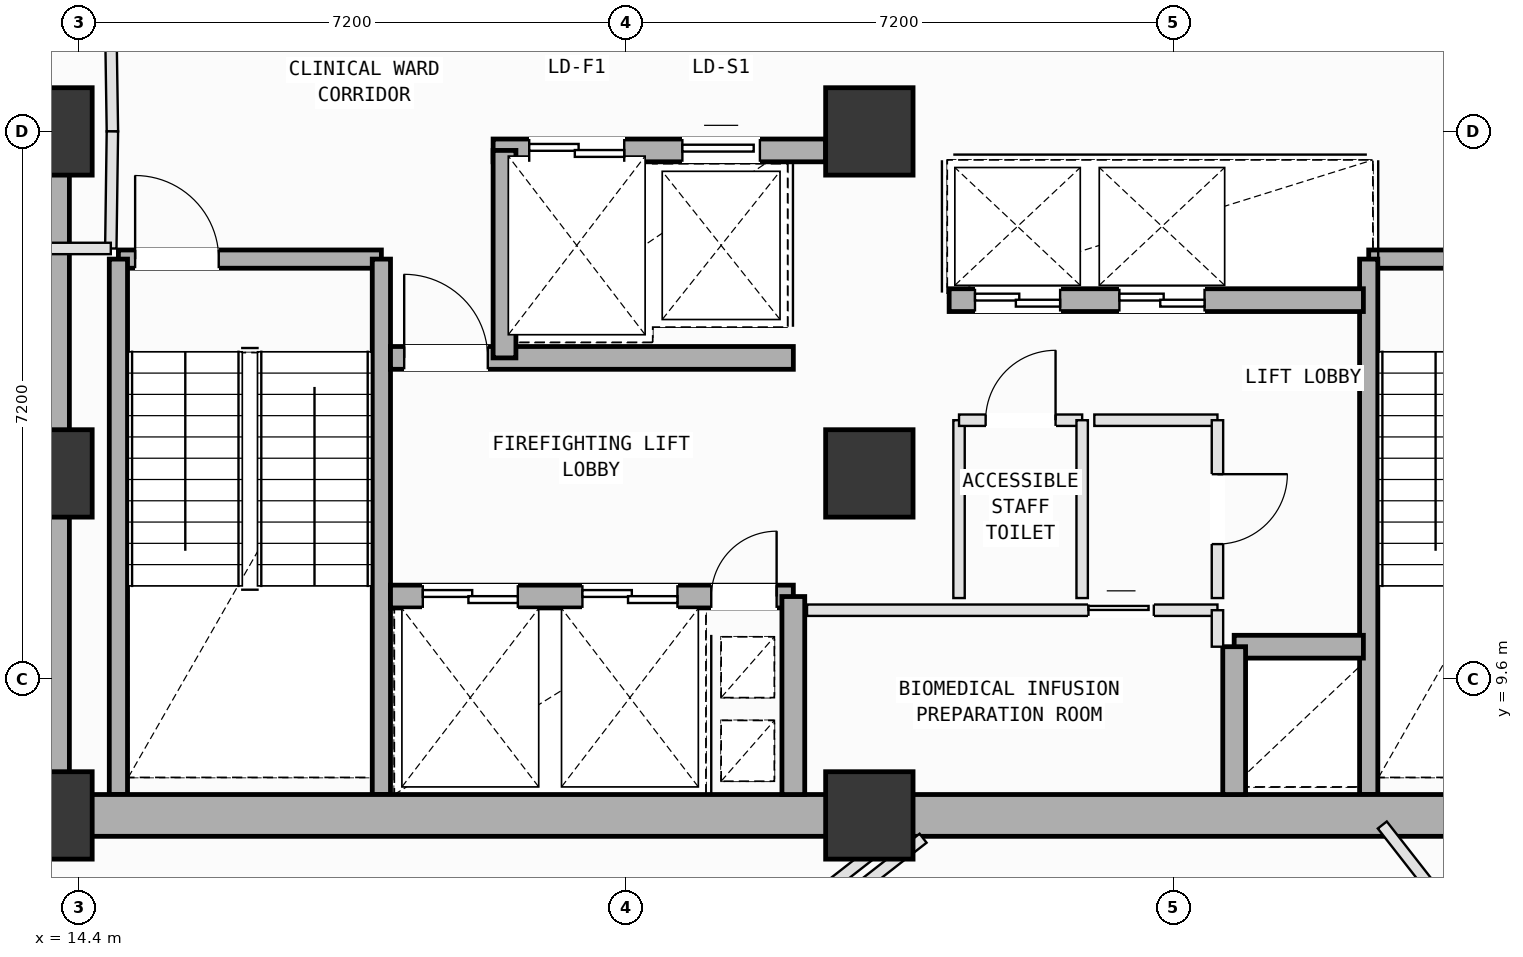
"""IFC4 building model, lengths in metres.
Left out: names, types, materials, properties, quantities, classifications, styles, units other than length and angle.
Written with IfcOpenShell. Run it as: python <this file> out.ifc"""

import sys

from ifc_helpers import new_model, si_unit, direction, frame, frame_2d, origin, origin_2d, place, context, subcontext, project, spatial, rectangle, extrude, element, fill, save


model = new_model("IFC4")
c1 = context("Model", 3, precision=1e-05, world=origin(), true_north=direction((0.0, 1.0)))
c2 = subcontext(c1, "Body", "Model", "MODEL_VIEW")
j1 = project(units=[si_unit("LENGTHUNIT", "METRE"), si_unit("PLANEANGLEUNIT", "RADIAN")], contexts=[c1])
p1 = place(None, origin())
s1 = spatial("IfcSite", under=j1, at=p1, CompositionType="ELEMENT")
p2 = place(p1, origin())
s2 = spatial("IfcBuilding", under=s1, at=p2, CompositionType="ELEMENT")
p3 = place(p2, frame((0.0, 0.0, 185.8)))
s3 = spatial("IfcBuildingStorey", under=s2, at=p3, CompositionType="ELEMENT", Elevation=185.8)
for number, where, z_axis, x_axis in (
    (1, (14.0, 7.8, 0.0), (0.0, 0.0, 1.0), (1.0, 0.0, 0.0)),
    (2, (14.0, 12.3, 0.0), (0.0, 0.0, 1.0), (1.0, 0.0, 0.0)),
    (3, (14.0, 16.8, 0.0), (0.0, 0.0, 1.0), (1.0, 0.0, 0.0)),
    (4, (24.8, 7.8, 0.0), (0.0, 0.0, 1.0), (1.0, 0.0, 0.0)),
    (5, (24.8, 12.3, 0.0), (0.0, 0.0, 1.0), (1.0, 0.0, 0.0)),
    (6, (24.8, 16.8, 0.0), (0.0, 0.0, 1.0), (1.0, 0.0, 0.0)),
):
    element("IfcColumn", number, at=place(p3, frame(where, z_axis=z_axis, x_axis=x_axis)), inside=s3, PredefinedType="COLUMN", context=c2, shape_type="SweptSolid", body=[
        extrude(rectangle(XDim=1.15, YDim=1.15, at=origin_2d()), origin(), (0.0, 0.0, 1.0), 4.0),
    ])
p4 = place(p3, frame((15.746, 3.066, 0.0), z_axis=(0.0, 0.0, 1.0), x_axis=(-0.615661421178, 0.788010795912, 0.0)))
e7 = element("IfcWall", 7, at=p4, inside=s3, PredefinedType="SOLIDWALL", context=c2, shape_type="SweptSolid", body=[
    extrude(rectangle(XDim=7.36, YDim=0.28, at=frame_2d((3.68, 0.0))), origin(), (0.0, 0.0, 1.0), 3.065),
])
p5 = place(p4, frame((1.788, 0.0, 0.75)))
e8 = element("IfcOpeningElement", 8, at=p5, cuts=e7, PredefinedType="OPENING", context=c2, shape_type="SweptSolid", body=[
    extrude(rectangle(XDim=2.0, YDim=1.95, at=frame_2d((1.0, 0.975))), frame((0.0, 0.15, 0.0), z_axis=(0.0, -1.0, 0.0), x_axis=(1.0, 0.0, 0.0)), (0.0, 0.0, 1.0), 0.3),
])
p6 = place(p3, frame((14.92, 15.12, 0.0), z_axis=(0.0, 0.0, 1.0), x_axis=(1.0, 0.0, 0.0)))
e9 = element("IfcWall", 9, at=p6, inside=s3, PredefinedType="SOLIDWALL", context=c2, shape_type="SweptSolid", body=[
    extrude(rectangle(XDim=3.46, YDim=0.24, at=frame_2d((1.73, 0.0))), origin(), (0.0, 0.0, 1.0), 3.78),
])
p7 = place(p6, frame((0.22, 0.0, 0.0)))
e10 = element("IfcOpeningElement", 10, at=p7, cuts=e9, PredefinedType="OPENING", context=c2, shape_type="SweptSolid", body=[
    extrude(rectangle(XDim=1.1, YDim=2.15, at=frame_2d((0.55, 1.075))), frame((0.0, 0.13, 0.0), z_axis=(0.0, -1.0, 0.0), x_axis=(1.0, 0.0, 0.0)), (0.0, 0.0, 1.0), 0.26),
])
for number, where, z_axis, x_axis in (
    (11, (18.38, 15.12, 0.0), (0.0, 0.0, 1.0), (0.0, -1.0, 0.0)),
    (12, (14.92, 8.075, 0.0), (0.0, 0.0, 1.0), (0.0, 1.0, 0.0)),
):
    element("IfcWall", number, at=place(p3, frame(where, z_axis=z_axis, x_axis=x_axis)), inside=s3, PredefinedType="SOLIDWALL", context=c2, shape_type="SweptSolid", body=[
        extrude(rectangle(XDim=7.045, YDim=0.24, at=frame_2d((3.522, 0.0))), origin(), (0.0, 0.0, 1.0), 3.78),
    ])
p8 = place(p3, frame((31.37, 15.12, 0.0), z_axis=(0.0, 0.0, 1.0), x_axis=(1.0, 0.0, 0.0)))
e13 = element("IfcWall", 13, at=p8, inside=s3, PredefinedType="SOLIDWALL", context=c2, shape_type="SweptSolid", body=[
    extrude(rectangle(XDim=3.46, YDim=0.24, at=frame_2d((1.73, 0.0))), origin(), (0.0, 0.0, 1.0), 3.78),
])
p9 = place(p8, frame((2.14, 0.0, 0.0)))
e14 = element("IfcOpeningElement", 14, at=p9, cuts=e13, PredefinedType="OPENING", context=c2, shape_type="SweptSolid", body=[
    extrude(rectangle(XDim=1.1, YDim=2.15, at=frame_2d((0.55, 1.075))), frame((0.0, 0.13, 0.0), z_axis=(0.0, -1.0, 0.0), x_axis=(1.0, 0.0, 0.0)), (0.0, 0.0, 1.0), 0.26),
])
p10 = place(p3, frame((31.37, 8.075, 0.0), z_axis=(0.0, 0.0, 1.0), x_axis=(0.0, 1.0, 0.0)))
e15 = element("IfcWall", 15, at=p10, inside=s3, PredefinedType="SOLIDWALL", context=c2, shape_type="SweptSolid", body=[
    extrude(rectangle(XDim=7.045, YDim=0.24, at=frame_2d((3.522, 0.0))), origin(), (0.0, 0.0, 1.0), 3.78),
])
for number, where, z_axis, x_axis in (
    (16, (14.0, 7.8, 0.0), (0.0, 0.0, 1.0), (1.0, 0.0, 0.0)),
    (17, (24.8, 7.8, 0.0), (0.0, 0.0, 1.0), (1.0, 0.0, 0.0)),
):
    element("IfcWall", number, at=place(p3, frame(where, z_axis=z_axis, x_axis=x_axis)), inside=s3, PredefinedType="SHEAR", context=c2, shape_type="SweptSolid", body=[
        extrude(rectangle(XDim=10.8, YDim=0.55, at=frame_2d((5.4, 0.0))), origin(), (0.0, 0.0, 1.0), 3.78),
    ])
p11 = place(p3, frame((14.0, 16.8, 0.0), z_axis=(0.0, 0.0, 1.0), x_axis=(0.0, -1.0, 0.0)))
e18 = element("IfcWall", 18, at=p11, inside=s3, PredefinedType="SHEAR", context=c2, shape_type="SweptSolid", body=[
    extrude(rectangle(XDim=9.0, YDim=0.55, at=frame_2d((4.5, 0.0))), origin(), (0.0, 0.0, 1.0), 3.78),
])
p12 = place(p3, frame((19.85, 16.55, 0.0), z_axis=(0.0, 0.0, 1.0), x_axis=(1.0, 0.0, 0.0)))
e19 = element("IfcWall", 19, at=p12, inside=s3, PredefinedType="SOLIDWALL", context=c2, shape_type="SweptSolid", body=[
    extrude(rectangle(XDim=4.375, YDim=0.3, at=frame_2d((2.188, 0.0))), origin(), (0.0, 0.0, 1.0), 3.78),
])
p13 = place(p12, frame((0.475, 0.0, 0.0)))
e20 = element("IfcOpeningElement", 20, at=p13, cuts=e19, PredefinedType="OPENING", context=c2, shape_type="SweptSolid", body=[
    extrude(rectangle(XDim=1.25, YDim=2.18, at=frame_2d((0.625, 1.09))), frame((0.0, 0.16, 0.0), z_axis=(0.0, -1.0, 0.0), x_axis=(1.0, 0.0, 0.0)), (0.0, 0.0, 1.0), 0.32),
])
p14 = place(p12, frame((2.49, 0.0, 0.0)))
e21 = element("IfcOpeningElement", 21, at=p14, cuts=e19, PredefinedType="OPENING", context=c2, shape_type="SweptSolid", body=[
    extrude(rectangle(XDim=1.02, YDim=2.12, at=frame_2d((0.51, 1.06))), frame((0.0, 0.16, 0.0), z_axis=(0.0, -1.0, 0.0), x_axis=(1.0, 0.0, 0.0)), (0.0, 0.0, 1.0), 0.32),
])
p15 = place(p3, frame((18.5, 10.68, 0.0), z_axis=(0.0, 0.0, 1.0), x_axis=(1.0, 0.0, 0.0)))
e22 = element("IfcWall", 22, at=p15, inside=s3, PredefinedType="SOLIDWALL", context=c2, shape_type="SweptSolid", body=[
    extrude(rectangle(XDim=5.3, YDim=0.3, at=frame_2d((2.65, 0.0))), origin(), (0.0, 0.0, 1.0), 3.78),
])
p16 = place(p15, frame((4.22, 0.0, 0.0)))
e23 = element("IfcOpeningElement", 23, at=p16, cuts=e22, PredefinedType="OPENING", context=c2, shape_type="SweptSolid", body=[
    extrude(rectangle(XDim=0.86, YDim=2.06, at=frame_2d((0.43, 1.03))), frame((0.0, 0.16, 0.0), z_axis=(0.0, -1.0, 0.0), x_axis=(1.0, 0.0, 0.0)), (0.0, 0.0, 1.0), 0.32),
])
p17 = place(p15, frame((0.425, 0.0, 0.0)))
e24 = element("IfcOpeningElement", 24, at=p17, cuts=e22, PredefinedType="OPENING", context=c2, shape_type="SweptSolid", body=[
    extrude(rectangle(XDim=1.25, YDim=2.18, at=frame_2d((0.625, 1.09))), frame((0.0, 0.16, 0.0), z_axis=(0.0, -1.0, 0.0), x_axis=(1.0, 0.0, 0.0)), (0.0, 0.0, 1.0), 0.32),
])
p18 = place(p15, frame((2.525, 0.0, 0.0)))
e25 = element("IfcOpeningElement", 25, at=p18, cuts=e22, PredefinedType="OPENING", context=c2, shape_type="SweptSolid", body=[
    extrude(rectangle(XDim=1.25, YDim=2.18, at=frame_2d((0.625, 1.09))), frame((0.0, 0.16, 0.0), z_axis=(0.0, -1.0, 0.0), x_axis=(1.0, 0.0, 0.0)), (0.0, 0.0, 1.0), 0.32),
])
p19 = place(p3, frame((18.5, 13.82, 0.0), z_axis=(0.0, 0.0, 1.0), x_axis=(1.0, 0.0, 0.0)))
e26 = element("IfcWall", 26, at=p19, inside=s3, PredefinedType="SOLIDWALL", context=c2, shape_type="SweptSolid", body=[
    extrude(rectangle(XDim=5.3, YDim=0.3, at=frame_2d((2.65, 0.0))), origin(), (0.0, 0.0, 1.0), 3.78),
])
p20 = place(p19, frame((0.18, 0.0, 0.0)))
e27 = element("IfcOpeningElement", 27, at=p20, cuts=e26, PredefinedType="OPENING", context=c2, shape_type="SweptSolid", body=[
    extrude(rectangle(XDim=1.1, YDim=2.15, at=frame_2d((0.55, 1.075))), frame((0.0, 0.16, 0.0), z_axis=(0.0, -1.0, 0.0), x_axis=(1.0, 0.0, 0.0)), (0.0, 0.0, 1.0), 0.32),
])
p21 = place(p3, frame((23.8, 8.075, 0.0), z_axis=(0.0, 0.0, 1.0), x_axis=(0.0, 1.0, 0.0)))
e28 = element("IfcWall", 28, at=p21, inside=s3, PredefinedType="SOLIDWALL", context=c2, shape_type="SweptSolid", body=[
    extrude(rectangle(XDim=2.605, YDim=0.3, at=frame_2d((1.302, 0.0))), origin(), (0.0, 0.0, 1.0), 3.78),
])
p22 = place(p3, frame((20.0, 13.82, 0.0), z_axis=(0.0, 0.0, 1.0), x_axis=(0.0, 1.0, 0.0)))
e29 = element("IfcWall", 29, at=p22, inside=s3, PredefinedType="SOLIDWALL", context=c2, shape_type="SweptSolid", body=[
    extrude(rectangle(XDim=2.73, YDim=0.3, at=frame_2d((1.365, 0.0))), origin(), (0.0, 0.0, 1.0), 3.78),
])
p23 = place(p3, frame((29.6, 10.02, 0.0), z_axis=(0.0, 0.0, 1.0), x_axis=(1.0, 0.0, 0.0)))
e30 = element("IfcWall", 30, at=p23, inside=s3, PredefinedType="SOLIDWALL", context=c2, shape_type="SweptSolid", body=[
    extrude(rectangle(XDim=1.7, YDim=0.3, at=frame_2d((0.85, 0.0))), origin(), (0.0, 0.0, 1.0), 3.78),
])
p24 = place(p3, frame((29.6, 8.075, 0.0), z_axis=(0.0, 0.0, 1.0), x_axis=(0.0, 1.0, 0.0)))
e31 = element("IfcWall", 31, at=p24, inside=s3, PredefinedType="SOLIDWALL", context=c2, shape_type="SweptSolid", body=[
    extrude(rectangle(XDim=1.945, YDim=0.3, at=frame_2d((0.973, 0.0))), origin(), (0.0, 0.0, 1.0), 3.78),
])
p25 = place(p3, frame((25.85, 14.58, 0.0), z_axis=(0.0, 0.0, 1.0), x_axis=(1.0, 0.0, 0.0)))
e32 = element("IfcWall", 32, at=p25, inside=s3, PredefinedType="SOLIDWALL", context=c2, shape_type="SweptSolid", body=[
    extrude(rectangle(XDim=5.45, YDim=0.3, at=frame_2d((2.725, 0.0))), origin(), (0.0, 0.0, 1.0), 3.78),
])
p26 = place(p25, frame((0.34, 0.0, 0.0)))
e33 = element("IfcOpeningElement", 33, at=p26, cuts=e32, PredefinedType="OPENING", context=c2, shape_type="SweptSolid", body=[
    extrude(rectangle(XDim=1.12, YDim=2.15, at=frame_2d((0.56, 1.075))), frame((0.0, 0.16, 0.0), z_axis=(0.0, -1.0, 0.0), x_axis=(1.0, 0.0, 0.0)), (0.0, 0.0, 1.0), 0.32),
])
p27 = place(p25, frame((2.24, 0.0, 0.0)))
e34 = element("IfcOpeningElement", 34, at=p27, cuts=e32, PredefinedType="OPENING", context=c2, shape_type="SweptSolid", body=[
    extrude(rectangle(XDim=1.12, YDim=2.15, at=frame_2d((0.56, 1.075))), frame((0.0, 0.16, 0.0), z_axis=(0.0, -1.0, 0.0), x_axis=(1.0, 0.0, 0.0)), (0.0, 0.0, 1.0), 0.32),
])
p28 = place(p3, frame((23.98, 10.5, 0.0), z_axis=(0.0, 0.0, 1.0), x_axis=(1.0, 0.0, 0.0)))
e35 = element("IfcWall", 35, at=p28, inside=s3, PredefinedType="PARTITIONING", context=c2, shape_type="SweptSolid", body=[
    extrude(rectangle(XDim=5.4, YDim=0.15, at=frame_2d((2.7, 0.0))), origin(), (0.0, 0.0, 1.0), 3.78),
])
p29 = place(p28, frame((3.703, 0.0, 0.0)))
e36 = element("IfcOpeningElement", 36, at=p29, cuts=e35, PredefinedType="OPENING", context=c2, shape_type="SweptSolid", body=[
    extrude(rectangle(XDim=0.86, YDim=2.06, at=frame_2d((0.43, 1.03))), frame((0.0, 0.085, 0.0), z_axis=(0.0, -1.0, 0.0), x_axis=(1.0, 0.0, 0.0)), (0.0, 0.0, 1.0), 0.17),
])
p30 = place(p3, frame((29.38, 10.5, 0.0), z_axis=(0.0, 0.0, 1.0), x_axis=(0.0, -1.0, 0.0)))
e37 = element("IfcWall", 37, at=p30, inside=s3, PredefinedType="PARTITIONING", context=c2, shape_type="SweptSolid", body=[
    extrude(rectangle(XDim=0.48, YDim=0.15, at=frame_2d((0.24, 0.0))), origin(), (0.0, 0.0, 1.0), 3.78),
])
p31 = place(p3, frame((25.98, 10.66, 0.0), z_axis=(0.0, 0.0, 1.0), x_axis=(0.0, 1.0, 0.0)))
e38 = element("IfcWall", 38, at=p31, inside=s3, PredefinedType="PARTITIONING", context=c2, shape_type="SweptSolid", body=[
    extrude(rectangle(XDim=2.34, YDim=0.15, at=frame_2d((1.17, 0.0))), origin(), (0.0, 0.0, 1.0), 3.78),
])
p32 = place(p3, frame((25.98, 13.0, 0.0), z_axis=(0.0, 0.0, 1.0), x_axis=(1.0, 0.0, 0.0)))
e39 = element("IfcWall", 39, at=p32, inside=s3, PredefinedType="PARTITIONING", context=c2, shape_type="SweptSolid", body=[
    extrude(rectangle(XDim=1.62, YDim=0.15, at=frame_2d((0.81, 0.0))), origin(), (0.0, 0.0, 1.0), 3.78),
])
p33 = place(p32, frame((0.35, 0.0, 0.0)))
e40 = element("IfcOpeningElement", 40, at=p33, cuts=e39, PredefinedType="OPENING", context=c2, shape_type="SweptSolid", body=[
    extrude(rectangle(XDim=0.92, YDim=2.1, at=frame_2d((0.46, 1.05))), frame((0.0, 0.085, 0.0), z_axis=(0.0, -1.0, 0.0), x_axis=(1.0, 0.0, 0.0)), (0.0, 0.0, 1.0), 0.17),
])
p34 = place(p3, frame((27.6, 13.0, 0.0), z_axis=(0.0, 0.0, 1.0), x_axis=(0.0, -1.0, 0.0)))
e41 = element("IfcWall", 41, at=p34, inside=s3, PredefinedType="PARTITIONING", context=c2, shape_type="SweptSolid", body=[
    extrude(rectangle(XDim=2.34, YDim=0.15, at=frame_2d((1.17, 0.0))), origin(), (0.0, 0.0, 1.0), 3.78),
])
p35 = place(p3, frame((27.76, 13.0, 0.0), z_axis=(0.0, 0.0, 1.0), x_axis=(1.0, 0.0, 0.0)))
e42 = element("IfcWall", 42, at=p35, inside=s3, PredefinedType="PARTITIONING", context=c2, shape_type="SweptSolid", body=[
    extrude(rectangle(XDim=1.62, YDim=0.15, at=frame_2d((0.81, 0.0))), origin(), (0.0, 0.0, 1.0), 3.78),
])
p36 = place(p3, frame((29.38, 13.0, 0.0), z_axis=(0.0, 0.0, 1.0), x_axis=(0.0, -1.0, 0.0)))
e43 = element("IfcWall", 43, at=p36, inside=s3, PredefinedType="PARTITIONING", context=c2, shape_type="SweptSolid", body=[
    extrude(rectangle(XDim=2.34, YDim=0.15, at=frame_2d((1.17, 0.0))), origin(), (0.0, 0.0, 1.0), 3.78),
])
p37 = place(p36, frame((0.71, 0.0, 0.0)))
e44 = element("IfcOpeningElement", 44, at=p37, cuts=e43, PredefinedType="OPENING", context=c2, shape_type="SweptSolid", body=[
    extrude(rectangle(XDim=0.92, YDim=2.1, at=frame_2d((0.46, 1.05))), frame((0.0, 0.085, 0.0), z_axis=(0.0, -1.0, 0.0), x_axis=(1.0, 0.0, 0.0)), (0.0, 0.0, 1.0), 0.17),
])
p38 = place(p3, frame((23.323, 5.794, 0.0), z_axis=(0.0, 0.0, 1.0), x_axis=(0.788069779756, 0.615585917833, 0.0)))
e45 = element("IfcWall", 45, at=p38, inside=s3, PredefinedType="PARTITIONING", context=c2, shape_type="SweptSolid", body=[
    extrude(rectangle(XDim=2.771, YDim=0.15, at=frame_2d((1.386, 0.0))), origin(), (0.0, 0.0, 1.0), 3.78),
])
p39 = place(p3, frame((31.549, 7.674, 0.0), z_axis=(0.0, 0.0, 1.0), x_axis=(0.615635907998, -0.788030728324, 0.0)))
e46 = element("IfcWall", 46, at=p39, inside=s3, PredefinedType="PARTITIONING", context=c2, shape_type="SweptSolid", body=[
    extrude(rectangle(XDim=9.902, YDim=0.15, at=frame_2d((4.951, 0.0))), origin(), (0.0, 0.0, 1.0), 3.78),
])
p40 = place(p39, frame((4.711, 0.0, 0.0)))
e47 = element("IfcOpeningElement", 47, at=p40, cuts=e46, PredefinedType="OPENING", context=c2, shape_type="SweptSolid", body=[
    extrude(rectangle(XDim=0.86, YDim=2.06, at=frame_2d((0.43, 1.03))), frame((0.0, 0.085, 0.0), z_axis=(0.0, -1.0, 0.0), x_axis=(1.0, 0.0, 0.0)), (0.0, 0.0, 1.0), 0.17),
])
p41 = place(p3, frame((25.085, 7.5, 0.0), z_axis=(0.0, 0.0, 1.0), x_axis=(-0.788054803654, -0.615605089678, 0.0)))
e48 = element("IfcWall", 48, at=p41, inside=s3, PredefinedType="PARTITIONING", context=c2, shape_type="SweptSolid", body=[
    extrude(rectangle(XDim=9.974, YDim=0.15, at=frame_2d((4.987, 0.0))), origin(), (0.0, 0.0, 1.0), 3.78),
])
p42 = place(p3, frame((14.82, 18.2, 0.0), z_axis=(0.0, 0.0, 1.0), x_axis=(0.01499656939, -0.99988754513, 0.0)))
e49 = element("IfcWall", 49, at=p42, inside=s3, PredefinedType="PARTITIONING", context=c2, shape_type="SweptSolid", body=[
    extrude(rectangle(XDim=1.4, YDim=0.15, at=frame_2d((0.7, 0.0))), origin(), (0.0, 0.0, 1.0), 3.78),
])
p43 = place(p3, frame((14.841, 16.8, 0.0), z_axis=(0.0, 0.0, 1.0), x_axis=(-0.01363221443, -0.999907077048, 0.0)))
e50 = element("IfcWall", 50, at=p43, inside=s3, PredefinedType="PARTITIONING", context=c2, shape_type="SweptSolid", body=[
    extrude(rectangle(XDim=1.54, YDim=0.15, at=frame_2d((0.77, 0.0))), origin(), (0.0, 0.0, 1.0), 3.78),
])
p44 = place(p3, frame((14.82, 15.26, 0.0), z_axis=(0.0, 0.0, 1.0), x_axis=(-1.0, 0.0, 0.0)))
e51 = element("IfcWall", 51, at=p44, inside=s3, PredefinedType="PARTITIONING", context=c2, shape_type="SweptSolid", body=[
    extrude(rectangle(XDim=1.12, YDim=0.15, at=frame_2d((0.56, 0.0))), origin(), (0.0, 0.0, 1.0), 3.78),
])
p45 = place(p3, frame((7.227, 14.157, 0.0), z_axis=(0.0, 0.0, 1.0), x_axis=(0.788028517416, 0.615638738011, 0.0)))
e52 = element("IfcWall", 52, at=p45, inside=s3, PredefinedType="PARTITIONING", context=c2, shape_type="SweptSolid", body=[
    extrude(rectangle(XDim=9.826, YDim=0.15, at=frame_2d((4.913, 0.0))), origin(), (0.0, 0.0, 1.0), 3.78),
])
p46 = place(p7, origin())
e53 = element("IfcDoor", 53, at=p46, inside=s3, OperationType="SINGLE_SWING_LEFT", PredefinedType="DOOR", context=c2, shape_type="SweptSolid", body=[
    extrude(rectangle(XDim=1.1, YDim=2.15, at=frame_2d((0.55, 1.075))), frame((0.0, 0.025, 0.0), z_axis=(0.0, -1.0, 0.0), x_axis=(1.0, 0.0, 0.0)), (0.0, 0.0, 1.0), 0.05),
])
fill(e10, e53)
p47 = place(p16, origin())
e54 = element("IfcDoor", 54, at=p47, inside=s3, OperationType="SINGLE_SWING_RIGHT", PredefinedType="DOOR", context=c2, shape_type="SweptSolid", body=[
    extrude(rectangle(XDim=0.86, YDim=2.06, at=frame_2d((0.43, 1.03))), frame((0.0, 0.025, 0.0), z_axis=(0.0, -1.0, 0.0), x_axis=(1.0, 0.0, 0.0)), (0.0, 0.0, 1.0), 0.05),
])
fill(e23, e54)
p48 = place(p20, origin())
e55 = element("IfcDoor", 55, at=p48, inside=s3, OperationType="SINGLE_SWING_LEFT", PredefinedType="DOOR", context=c2, shape_type="SweptSolid", body=[
    extrude(rectangle(XDim=1.1, YDim=2.15, at=frame_2d((0.55, 1.075))), frame((0.0, 0.025, 0.0), z_axis=(0.0, -1.0, 0.0), x_axis=(1.0, 0.0, 0.0)), (0.0, 0.0, 1.0), 0.05),
])
fill(e27, e55)
p49 = place(p17, origin())
e56 = element("IfcDoor", 56, at=p49, inside=s3, OperationType="DOUBLE_DOOR_SLIDING", PredefinedType="DOOR", context=c2, shape_type="SweptSolid", body=[
    extrude(rectangle(XDim=1.25, YDim=2.18, at=frame_2d((0.625, 1.09))), frame((0.0, 0.025, 0.0), z_axis=(0.0, -1.0, 0.0), x_axis=(1.0, 0.0, 0.0)), (0.0, 0.0, 1.0), 0.05),
])
fill(e24, e56)
p50 = place(p18, origin())
e57 = element("IfcDoor", 57, at=p50, inside=s3, OperationType="DOUBLE_DOOR_SLIDING", PredefinedType="DOOR", context=c2, shape_type="SweptSolid", body=[
    extrude(rectangle(XDim=1.25, YDim=2.18, at=frame_2d((0.625, 1.09))), frame((0.0, 0.025, 0.0), z_axis=(0.0, -1.0, 0.0), x_axis=(1.0, 0.0, 0.0)), (0.0, 0.0, 1.0), 0.05),
])
fill(e25, e57)
p51 = place(p26, origin())
e58 = element("IfcDoor", 58, at=p51, inside=s3, OperationType="DOUBLE_DOOR_SLIDING", PredefinedType="DOOR", context=c2, shape_type="SweptSolid", body=[
    extrude(rectangle(XDim=1.12, YDim=2.15, at=frame_2d((0.56, 1.075))), frame((0.0, 0.025, 0.0), z_axis=(0.0, -1.0, 0.0), x_axis=(1.0, 0.0, 0.0)), (0.0, 0.0, 1.0), 0.05),
])
fill(e33, e58)
p52 = place(p27, origin())
e59 = element("IfcDoor", 59, at=p52, inside=s3, OperationType="DOUBLE_DOOR_SLIDING", PredefinedType="DOOR", context=c2, shape_type="SweptSolid", body=[
    extrude(rectangle(XDim=1.12, YDim=2.15, at=frame_2d((0.56, 1.075))), frame((0.0, 0.025, 0.0), z_axis=(0.0, -1.0, 0.0), x_axis=(1.0, 0.0, 0.0)), (0.0, 0.0, 1.0), 0.05),
])
fill(e34, e59)
p53 = place(p13, origin())
e60 = element("IfcDoor", 60, at=p53, inside=s3, OperationType="DOUBLE_DOOR_SLIDING", PredefinedType="DOOR", context=c2, shape_type="SweptSolid", body=[
    extrude(rectangle(XDim=1.25, YDim=2.18, at=frame_2d((0.625, 1.09))), frame((0.0, 0.025, 0.0), z_axis=(0.0, -1.0, 0.0), x_axis=(1.0, 0.0, 0.0)), (0.0, 0.0, 1.0), 0.05),
])
fill(e20, e60)
p54 = place(p14, origin())
e61 = element("IfcDoor", 61, at=p54, inside=s3, OperationType="SLIDING_TO_LEFT", PredefinedType="DOOR", context=c2, shape_type="SweptSolid", body=[
    extrude(rectangle(XDim=1.02, YDim=2.12, at=frame_2d((0.51, 1.06))), frame((0.0, 0.025, 0.0), z_axis=(0.0, -1.0, 0.0), x_axis=(1.0, 0.0, 0.0)), (0.0, 0.0, 1.0), 0.05),
])
fill(e21, e61)
p55 = place(p33, origin())
e62 = element("IfcDoor", 62, at=p55, inside=s3, OperationType="SINGLE_SWING_RIGHT", PredefinedType="DOOR", context=c2, shape_type="SweptSolid", body=[
    extrude(rectangle(XDim=0.92, YDim=2.1, at=frame_2d((0.46, 1.05))), frame((0.0, 0.025, 0.0), z_axis=(0.0, -1.0, 0.0), x_axis=(1.0, 0.0, 0.0)), (0.0, 0.0, 1.0), 0.05),
])
fill(e40, e62)
p56 = place(p37, origin())
e63 = element("IfcDoor", 63, at=p56, inside=s3, OperationType="SINGLE_SWING_LEFT", PredefinedType="DOOR", context=c2, shape_type="SweptSolid", body=[
    extrude(rectangle(XDim=0.92, YDim=2.1, at=frame_2d((0.46, 1.05))), frame((0.0, 0.025, 0.0), z_axis=(0.0, -1.0, 0.0), x_axis=(1.0, 0.0, 0.0)), (0.0, 0.0, 1.0), 0.05),
])
fill(e44, e63)
p57 = place(p29, origin())
e64 = element("IfcDoor", 64, at=p57, inside=s3, OperationType="SLIDING_TO_LEFT", PredefinedType="DOOR", context=c2, shape_type="SweptSolid", body=[
    extrude(rectangle(XDim=0.86, YDim=2.06, at=frame_2d((0.43, 1.03))), frame((0.0, 0.025, 0.0), z_axis=(0.0, -1.0, 0.0), x_axis=(1.0, 0.0, 0.0)), (0.0, 0.0, 1.0), 0.05),
])
fill(e36, e64)
save(model, sys.argv[1])
